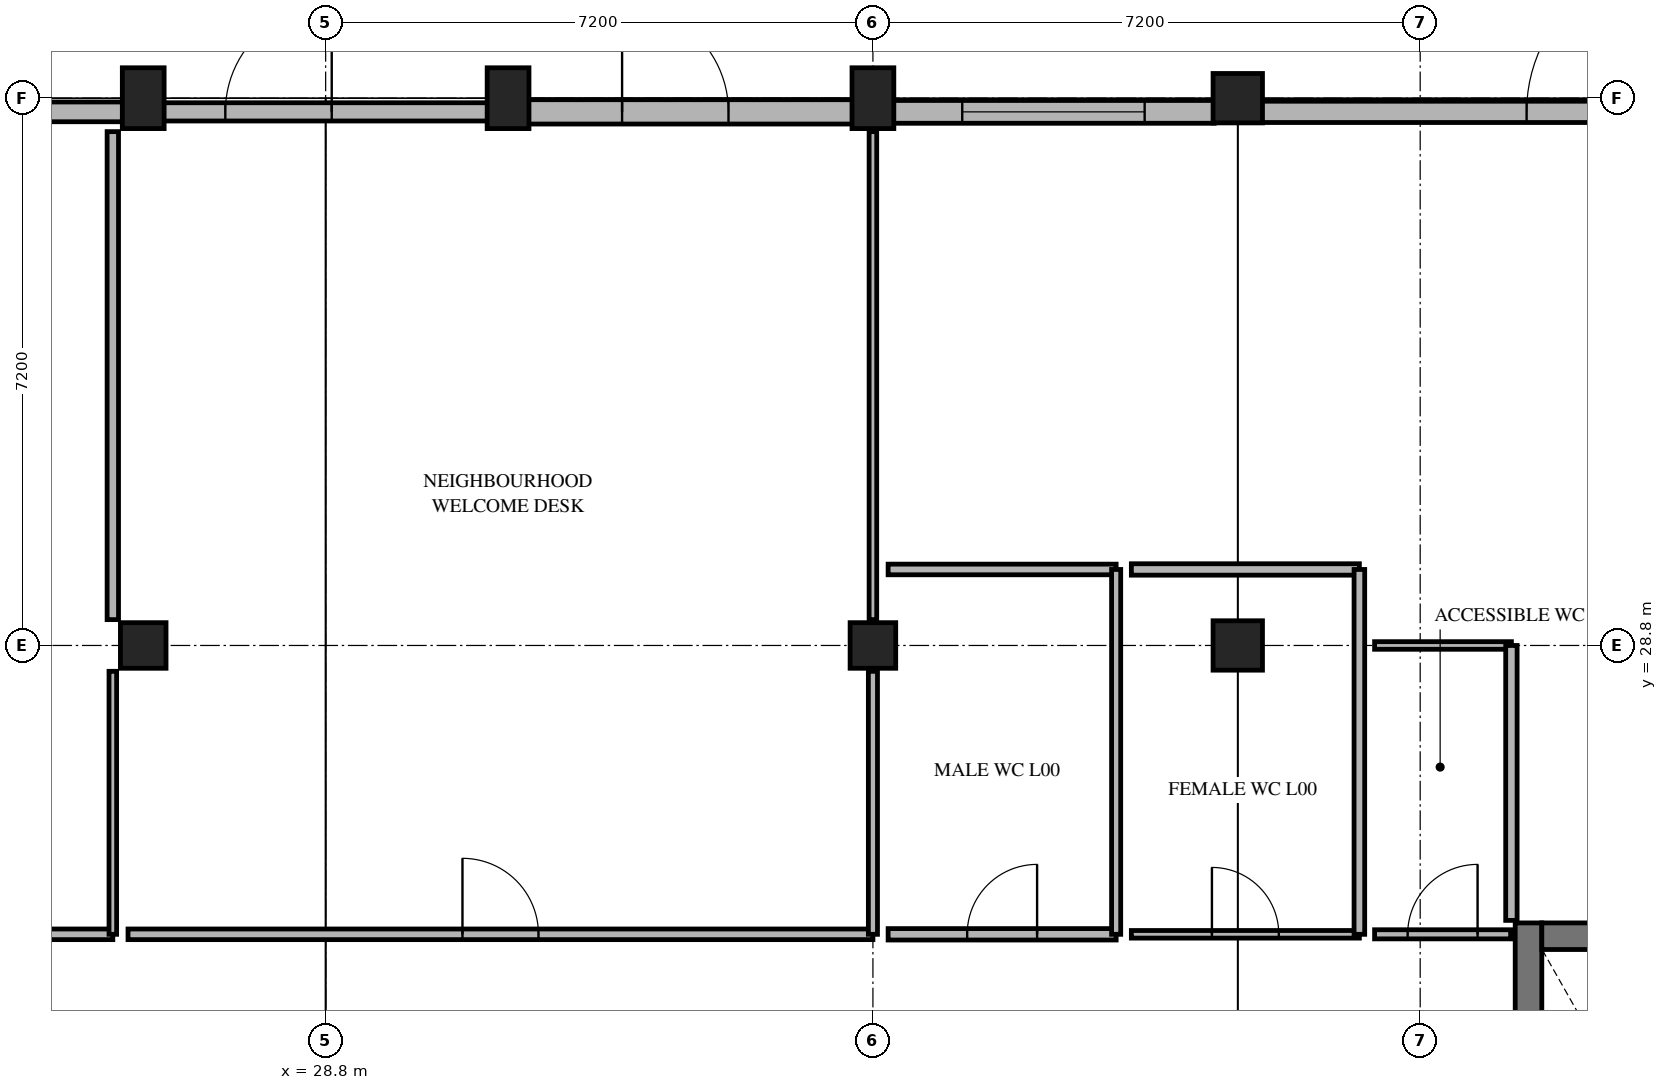
"""IFC4 building model, lengths in metres.
Left out: names, types, materials, properties, quantities, classifications, styles, units other than length and angle.
Written with IfcOpenShell. Run it as: python <this file> out.ifc"""

import sys

from ifc_helpers import new_model, si_unit, direction, frame, frame_2d, origin, origin_2d, place, context, subcontext, project, spatial, rectangle, extrude, element, fill, save


model = new_model("IFC4")
c1 = context("Model", 3, precision=1e-05, world=origin(), true_north=direction((0.0, 1.0)))
c2 = subcontext(c1, "Body", "Model", "MODEL_VIEW")
j1 = project(units=[si_unit("LENGTHUNIT", "METRE"), si_unit("PLANEANGLEUNIT", "RADIAN")], contexts=[c1])
p1 = place(None, origin())
s1 = spatial("IfcSite", under=j1, at=p1, CompositionType="ELEMENT")
p2 = place(p1, origin())
s2 = spatial("IfcBuilding", under=s1, at=p2, CompositionType="ELEMENT")
p3 = place(p2, origin())
s3 = spatial("IfcBuildingStorey", under=s2, at=p3, CompositionType="ELEMENT", Elevation=0.0)
for number, where, z_axis, x_axis in (
    (1, (40.8, 28.8, 0.0), (0.0, 0.0, 1.0), (1.0, 0.0, 0.0)),
    (2, (40.8, 36.0, 0.0), (0.0, 0.0, 1.0), (1.0, 0.0, 0.0)),
):
    element("IfcColumn", number, at=place(p3, frame(where, z_axis=z_axis, x_axis=x_axis)), inside=s3, PredefinedType="COLUMN", context=c2, shape_type="SweptSolid", body=[
        extrude(rectangle(XDim=0.65, YDim=0.65, at=origin_2d()), origin(), (0.0, 0.0, 1.0), 4.5),
    ])
for number, where, z_axis, x_axis in (
    (3, (26.4, 36.0, 0.0), (0.0, 0.0, 1.0), (1.0, 0.0, 0.0)),
    (4, (31.2, 36.0, 0.0), (0.0, 0.0, 1.0), (1.0, 0.0, 0.0)),
    (5, (36.0, 36.0, 0.0), (0.0, 0.0, 1.0), (1.0, 0.0, 0.0)),
):
    element("IfcColumn", number, at=place(p3, frame(where, z_axis=z_axis, x_axis=x_axis)), inside=s3, PredefinedType="COLUMN", context=c2, shape_type="SweptSolid", body=[
        extrude(rectangle(XDim=0.55, YDim=0.8, at=origin_2d()), origin(), (0.0, 0.0, 1.0), 4.5),
    ])
for number, where, z_axis, x_axis in (
    (6, (26.4, 28.8, 0.0), (0.0, 0.0, 1.0), (1.0, 0.0, 0.0)),
    (7, (36.0, 28.8, 0.0), (0.0, 0.0, 1.0), (1.0, 0.0, 0.0)),
):
    element("IfcColumn", number, at=place(p3, frame(where, z_axis=z_axis, x_axis=x_axis)), inside=s3, PredefinedType="COLUMN", context=c2, shape_type="SweptSolid", body=[
        extrude(rectangle(XDim=0.6, YDim=0.6, at=origin_2d()), origin(), (0.0, 0.0, 1.0), 4.5),
    ])
p4 = place(p3, frame((21.86, 35.82, 0.0), z_axis=(0.0, 0.0, 1.0), x_axis=(1.0, 0.0, 0.0)))
e8 = element("IfcWall", 8, at=p4, inside=s3, PredefinedType="SOLIDWALL", context=c2, shape_type="SweptSolid", body=[
    extrude(rectangle(XDim=4.28, YDim=0.26, at=frame_2d((2.14, 0.0))), origin(), (0.0, 0.0, 1.0), 3.49),
])
p5 = place(p4, frame((0.77, 0.0, 0.0)))
e9 = element("IfcOpeningElement", 9, at=p5, cuts=e8, PredefinedType="OPENING", context=c2, shape_type="SweptSolid", body=[
    extrude(rectangle(XDim=1.6, YDim=2.3, at=frame_2d((0.8, 1.15))), frame((0.0, 0.14, 0.0), z_axis=(0.0, -1.0, 0.0), x_axis=(1.0, 0.0, 0.0)), (0.0, 0.0, 1.0), 0.28),
])
p6 = place(p3, frame((26.66, 35.82, 0.0), z_axis=(0.0, 0.0, 1.0), x_axis=(1.0, 0.0, 0.0)))
e10 = element("IfcWall", 10, at=p6, inside=s3, PredefinedType="SOLIDWALL", context=c2, shape_type="SweptSolid", body=[
    extrude(rectangle(XDim=4.28, YDim=0.24, at=frame_2d((2.14, 0.0))), origin(), (0.0, 0.0, 1.0), 3.54),
])
p7 = place(p6, frame((0.82, 0.0, 0.0)))
e11 = element("IfcOpeningElement", 11, at=p7, cuts=e10, PredefinedType="OPENING", context=c2, shape_type="SweptSolid", body=[
    extrude(rectangle(XDim=1.4, YDim=2.2, at=frame_2d((0.7, 1.1))), frame((0.0, 0.13, 0.0), z_axis=(0.0, -1.0, 0.0), x_axis=(1.0, 0.0, 0.0)), (0.0, 0.0, 1.0), 0.26),
])
p8 = place(p3, frame((31.46, 35.82, 0.0), z_axis=(0.0, 0.0, 1.0), x_axis=(1.0, 0.0, 0.0)))
e12 = element("IfcWall", 12, at=p8, inside=s3, PredefinedType="SOLIDWALL", context=c2, shape_type="SweptSolid", body=[
    extrude(rectangle(XDim=4.28, YDim=0.32, at=frame_2d((2.14, 0.0))), origin(), (0.0, 0.0, 1.0), 3.59),
])
p9 = place(p8, frame((1.24, 0.0, 0.0)))
e13 = element("IfcOpeningElement", 13, at=p9, cuts=e12, PredefinedType="OPENING", context=c2, shape_type="SweptSolid", body=[
    extrude(rectangle(XDim=1.4, YDim=2.2, at=frame_2d((0.7, 1.1))), frame((0.0, 0.17, 0.0), z_axis=(0.0, -1.0, 0.0), x_axis=(1.0, 0.0, 0.0)), (0.0, 0.0, 1.0), 0.34),
])
p10 = place(p3, frame((36.26, 35.82, 0.0), z_axis=(0.0, 0.0, 1.0), x_axis=(1.0, 0.0, 0.0)))
e14 = element("IfcWall", 14, at=p10, inside=s3, PredefinedType="SOLIDWALL", context=c2, shape_type="SweptSolid", body=[
    extrude(rectangle(XDim=4.23, YDim=0.3, at=frame_2d((2.115, 0.0))), origin(), (0.0, 0.0, 1.0), 3.64),
])
p11 = place(p10, frame((0.915, 0.0, 0.9)))
e15 = element("IfcOpeningElement", 15, at=p11, cuts=e14, PredefinedType="OPENING", context=c2, shape_type="SweptSolid", body=[
    extrude(rectangle(XDim=2.4, YDim=1.35, at=frame_2d((1.2, 0.675))), frame((0.0, 0.16, 0.0), z_axis=(0.0, -1.0, 0.0), x_axis=(1.0, 0.0, 0.0)), (0.0, 0.0, 1.0), 0.32),
])
p12 = place(p3, frame((41.11, 35.82, 0.0), z_axis=(0.0, 0.0, 1.0), x_axis=(1.0, 0.0, 0.0)))
e16 = element("IfcWall", 16, at=p12, inside=s3, PredefinedType="SOLIDWALL", context=c2, shape_type="SweptSolid", body=[
    extrude(rectangle(XDim=8.98, YDim=0.28, at=frame_2d((4.49, 0.0))), origin(), (0.0, 0.0, 1.0), 3.44),
])
p13 = place(p12, frame((3.49, 0.0, 0.0)))
e17 = element("IfcOpeningElement", 17, at=p13, cuts=e16, PredefinedType="OPENING", context=c2, shape_type="SweptSolid", body=[
    extrude(rectangle(XDim=2.0, YDim=2.4, at=frame_2d((1.0, 1.2))), frame((0.0, 0.15, 0.0), z_axis=(0.0, -1.0, 0.0), x_axis=(1.0, 0.0, 0.0)), (0.0, 0.0, 1.0), 0.3),
])
p14 = place(p3, frame((44.625, 25.15, 0.0), z_axis=(0.0, 0.0, 1.0), x_axis=(0.0, -1.0, 0.0)))
e18 = element("IfcWall", 18, at=p14, inside=s3, PredefinedType="SHEAR", context=c2, shape_type="SweptSolid", body=[
    extrude(rectangle(XDim=9.1, YDim=0.35, at=frame_2d((4.55, 0.0))), origin(), (0.0, 0.0, 1.0), 4.24),
])
p15 = place(p3, frame((48.55, 24.975, 0.0), z_axis=(0.0, 0.0, 1.0), x_axis=(-1.0, 0.0, 0.0)))
e19 = element("IfcWall", 19, at=p15, inside=s3, PredefinedType="SHEAR", context=c2, shape_type="SweptSolid", body=[
    extrude(rectangle(XDim=3.75, YDim=0.35, at=frame_2d((1.875, 0.0))), origin(), (0.0, 0.0, 1.0), 4.24),
])
p16 = place(p3, frame((10.8, 25.0, 0.0), z_axis=(0.0, 0.0, 1.0), x_axis=(1.0, 0.0, 0.0)))
e20 = element("IfcWall", 20, at=p16, inside=s3, PredefinedType="PARTITIONING", context=c2, shape_type="SweptSolid", body=[
    extrude(rectangle(XDim=15.2, YDim=0.14, at=frame_2d((7.6, 0.0))), origin(), (0.0, 0.0, 1.0), 3.44),
])
p17 = place(p16, frame((7.05, 0.0, 0.0)))
e21 = element("IfcOpeningElement", 21, at=p17, cuts=e20, PredefinedType="OPENING", context=c2, shape_type="SweptSolid", body=[
    extrude(rectangle(XDim=1.1, YDim=2.15, at=frame_2d((0.55, 1.075))), frame((0.0, 0.08, 0.0), z_axis=(0.0, -1.0, 0.0), x_axis=(1.0, 0.0, 0.0)), (0.0, 0.0, 1.0), 0.16),
])
p18 = place(p3, frame((26.0, 25.0, 0.0), z_axis=(0.0, 0.0, 1.0), x_axis=(0.0, 1.0, 0.0)))
e22 = element("IfcWall", 22, at=p18, inside=s3, PredefinedType="PARTITIONING", context=c2, shape_type="SweptSolid", body=[
    extrude(rectangle(XDim=3.46, YDim=0.1, at=frame_2d((1.73, 0.0))), origin(), (0.0, 0.0, 1.0), 3.48),
])
p19 = place(p3, frame((26.0, 29.14, 0.0), z_axis=(0.0, 0.0, 1.0), x_axis=(0.0, 1.0, 0.0)))
e23 = element("IfcWall", 23, at=p19, inside=s3, PredefinedType="PARTITIONING", context=c2, shape_type="SweptSolid", body=[
    extrude(rectangle(XDim=6.42, YDim=0.15, at=frame_2d((3.21, 0.0))), origin(), (0.0, 0.0, 1.0), 3.69),
])
p20 = place(p3, frame((26.2, 25.0, 0.0), z_axis=(0.0, 0.0, 1.0), x_axis=(1.0, 0.0, 0.0)))
e24 = element("IfcWall", 24, at=p20, inside=s3, PredefinedType="PARTITIONING", context=c2, shape_type="SweptSolid", body=[
    extrude(rectangle(XDim=9.8, YDim=0.14, at=frame_2d((4.9, 0.0))), origin(), (0.0, 0.0, 1.0), 3.44),
])
p21 = place(p20, frame((4.4, 0.0, 0.0)))
e25 = element("IfcOpeningElement", 25, at=p21, cuts=e24, PredefinedType="OPENING", context=c2, shape_type="SweptSolid", body=[
    extrude(rectangle(XDim=1.0, YDim=2.15, at=frame_2d((0.5, 1.075))), frame((0.0, 0.08, 0.0), z_axis=(0.0, -1.0, 0.0), x_axis=(1.0, 0.0, 0.0)), (0.0, 0.0, 1.0), 0.16),
])
p22 = place(p3, frame((36.0, 25.0, 0.0), z_axis=(0.0, 0.0, 1.0), x_axis=(0.0, 1.0, 0.0)))
e26 = element("IfcWall", 26, at=p22, inside=s3, PredefinedType="PARTITIONING", context=c2, shape_type="SweptSolid", body=[
    extrude(rectangle(XDim=3.46, YDim=0.12, at=frame_2d((1.73, 0.0))), origin(), (0.0, 0.0, 1.0), 3.44),
])
p23 = place(p3, frame((36.0, 29.14, 0.0), z_axis=(0.0, 0.0, 1.0), x_axis=(0.0, 1.0, 0.0)))
e27 = element("IfcWall", 27, at=p23, inside=s3, PredefinedType="PARTITIONING", context=c2, shape_type="SweptSolid", body=[
    extrude(rectangle(XDim=6.42, YDim=0.1, at=frame_2d((3.21, 0.0))), origin(), (0.0, 0.0, 1.0), 3.49),
])
p24 = place(p3, frame((36.2, 25.0, 0.0), z_axis=(0.0, 0.0, 1.0), x_axis=(1.0, 0.0, 0.0)))
e28 = element("IfcWall", 28, at=p24, inside=s3, PredefinedType="PARTITIONING", context=c2, shape_type="SweptSolid", body=[
    extrude(rectangle(XDim=3.0, YDim=0.15, at=frame_2d((1.5, 0.0))), origin(), (0.0, 0.0, 1.0), 3.44),
])
p25 = place(p24, frame((1.04, 0.0, 0.0)))
e29 = element("IfcOpeningElement", 29, at=p25, cuts=e28, PredefinedType="OPENING", context=c2, shape_type="SweptSolid", body=[
    extrude(rectangle(XDim=0.92, YDim=2.1, at=frame_2d((0.46, 1.05))), frame((0.0, 0.085, 0.0), z_axis=(0.0, -1.0, 0.0), x_axis=(1.0, 0.0, 0.0)), (0.0, 0.0, 1.0), 0.17),
])
p26 = place(p3, frame((39.2, 29.8, 0.0), z_axis=(0.0, 0.0, 1.0), x_axis=(-1.0, 0.0, 0.0)))
e30 = element("IfcWall", 30, at=p26, inside=s3, PredefinedType="PARTITIONING", context=c2, shape_type="SweptSolid", body=[
    extrude(rectangle(XDim=3.0, YDim=0.14, at=frame_2d((1.5, 0.0))), origin(), (0.0, 0.0, 1.0), 3.49),
])
p27 = place(p3, frame((39.2, 25.0, 0.0), z_axis=(0.0, 0.0, 1.0), x_axis=(0.0, 1.0, 0.0)))
e31 = element("IfcWall", 31, at=p27, inside=s3, PredefinedType="PARTITIONING", context=c2, shape_type="SweptSolid", body=[
    extrude(rectangle(XDim=4.8, YDim=0.12, at=frame_2d((2.4, 0.0))), origin(), (0.0, 0.0, 1.0), 3.62),
])
p28 = place(p3, frame((39.4, 25.0, 0.0), z_axis=(0.0, 0.0, 1.0), x_axis=(1.0, 0.0, 0.0)))
e32 = element("IfcWall", 32, at=p28, inside=s3, PredefinedType="PARTITIONING", context=c2, shape_type="SweptSolid", body=[
    extrude(rectangle(XDim=3.0, YDim=0.1, at=frame_2d((1.5, 0.0))), origin(), (0.0, 0.0, 1.0), 3.44),
])
p29 = place(p28, frame((1.06, 0.0, 0.0)))
e33 = element("IfcOpeningElement", 33, at=p29, cuts=e32, PredefinedType="OPENING", context=c2, shape_type="SweptSolid", body=[
    extrude(rectangle(XDim=0.88, YDim=2.1, at=frame_2d((0.44, 1.05))), frame((0.0, 0.06, 0.0), z_axis=(0.0, -1.0, 0.0), x_axis=(1.0, 0.0, 0.0)), (0.0, 0.0, 1.0), 0.12),
])
p30 = place(p3, frame((42.4, 29.8, 0.0), z_axis=(0.0, 0.0, 1.0), x_axis=(-1.0, 0.0, 0.0)))
e34 = element("IfcWall", 34, at=p30, inside=s3, PredefinedType="PARTITIONING", context=c2, shape_type="SweptSolid", body=[
    extrude(rectangle(XDim=3.0, YDim=0.15, at=frame_2d((1.5, 0.0))), origin(), (0.0, 0.0, 1.0), 3.49),
])
p31 = place(p3, frame((42.4, 25.0, 0.0), z_axis=(0.0, 0.0, 1.0), x_axis=(0.0, 1.0, 0.0)))
e35 = element("IfcWall", 35, at=p31, inside=s3, PredefinedType="PARTITIONING", context=c2, shape_type="SweptSolid", body=[
    extrude(rectangle(XDim=4.8, YDim=0.14, at=frame_2d((2.4, 0.0))), origin(), (0.0, 0.0, 1.0), 3.44),
])
p32 = place(p3, frame((42.6, 25.0, 0.0), z_axis=(0.0, 0.0, 1.0), x_axis=(1.0, 0.0, 0.0)))
e36 = element("IfcWall", 36, at=p32, inside=s3, PredefinedType="PARTITIONING", context=c2, shape_type="SweptSolid", body=[
    extrude(rectangle(XDim=1.79, YDim=0.12, at=frame_2d((0.895, 0.0))), origin(), (0.0, 0.0, 1.0), 4.24),
])
p33 = place(p32, frame((0.435, 0.0, 0.0)))
e37 = element("IfcOpeningElement", 37, at=p33, cuts=e36, PredefinedType="OPENING", context=c2, shape_type="SweptSolid", body=[
    extrude(rectangle(XDim=0.92, YDim=2.1, at=frame_2d((0.46, 1.05))), frame((0.0, 0.07, 0.0), z_axis=(0.0, -1.0, 0.0), x_axis=(1.0, 0.0, 0.0)), (0.0, 0.0, 1.0), 0.14),
])
p34 = place(p3, frame((44.4, 28.8, 0.0), z_axis=(0.0, 0.0, 1.0), x_axis=(-1.0, 0.0, 0.0)))
e38 = element("IfcWall", 38, at=p34, inside=s3, PredefinedType="PARTITIONING", context=c2, shape_type="SweptSolid", body=[
    extrude(rectangle(XDim=1.8, YDim=0.1, at=frame_2d((0.9, 0.0))), origin(), (0.0, 0.0, 1.0), 3.44),
])
p35 = place(p3, frame((44.4, 25.183, 0.0), z_axis=(0.0, 0.0, 1.0), x_axis=(0.0, 1.0, 0.0)))
e39 = element("IfcWall", 39, at=p35, inside=s3, PredefinedType="PARTITIONING", context=c2, shape_type="SweptSolid", body=[
    extrude(rectangle(XDim=3.617, YDim=0.15, at=frame_2d((1.809, 0.0))), origin(), (0.0, 0.0, 1.0), 3.44),
])
p36 = place(p7, origin())
e40 = element("IfcDoor", 40, at=p36, inside=s3, OperationType="SINGLE_SWING_RIGHT", PredefinedType="DOOR", context=c2, shape_type="SweptSolid", body=[
    extrude(rectangle(XDim=1.4, YDim=2.2, at=frame_2d((0.7, 1.1))), frame((0.0, 0.025, 0.0), z_axis=(0.0, -1.0, 0.0), x_axis=(1.0, 0.0, 0.0)), (0.0, 0.0, 1.0), 0.05),
])
fill(e11, e40)
p37 = place(p9, origin())
e41 = element("IfcDoor", 41, at=p37, inside=s3, OperationType="SINGLE_SWING_LEFT", PredefinedType="DOOR", context=c2, shape_type="SweptSolid", body=[
    extrude(rectangle(XDim=1.4, YDim=2.2, at=frame_2d((0.7, 1.1))), frame((0.0, 0.025, 0.0), z_axis=(0.0, -1.0, 0.0), x_axis=(1.0, 0.0, 0.0)), (0.0, 0.0, 1.0), 0.05),
])
fill(e13, e41)
p38 = place(p11, origin())
e42 = element("IfcWindow", 42, at=p38, inside=s3, PartitioningType="SINGLE_PANEL", PredefinedType="WINDOW", context=c2, shape_type="SweptSolid", body=[
    extrude(rectangle(XDim=2.4, YDim=1.35, at=frame_2d((1.2, 0.675))), frame((0.0, 0.03, 0.0), z_axis=(0.0, -1.0, 0.0), x_axis=(1.0, 0.0, 0.0)), (0.0, 0.0, 1.0), 0.06),
])
fill(e15, e42)
p39 = place(p13, origin())
e43 = element("IfcDoor", 43, at=p39, inside=s3, OperationType="SINGLE_SWING_RIGHT", PredefinedType="DOOR", context=c2, shape_type="SweptSolid", body=[
    extrude(rectangle(XDim=2.0, YDim=2.4, at=frame_2d((1.0, 1.2))), frame((0.0, 0.025, 0.0), z_axis=(0.0, -1.0, 0.0), x_axis=(1.0, 0.0, 0.0)), (0.0, 0.0, 1.0), 0.05),
])
fill(e17, e43)
p40 = place(p21, origin())
e44 = element("IfcDoor", 44, at=p40, inside=s3, OperationType="SINGLE_SWING_LEFT", PredefinedType="DOOR", context=c2, shape_type="SweptSolid", body=[
    extrude(rectangle(XDim=1.0, YDim=2.15, at=frame_2d((0.5, 1.075))), frame((0.0, 0.025, 0.0), z_axis=(0.0, -1.0, 0.0), x_axis=(1.0, 0.0, 0.0)), (0.0, 0.0, 1.0), 0.05),
])
fill(e25, e44)
p41 = place(p25, origin())
e45 = element("IfcDoor", 45, at=p41, inside=s3, OperationType="SINGLE_SWING_RIGHT", PredefinedType="DOOR", context=c2, shape_type="SweptSolid", body=[
    extrude(rectangle(XDim=0.92, YDim=2.1, at=frame_2d((0.46, 1.05))), frame((0.0, 0.025, 0.0), z_axis=(0.0, -1.0, 0.0), x_axis=(1.0, 0.0, 0.0)), (0.0, 0.0, 1.0), 0.05),
])
fill(e29, e45)
p42 = place(p29, origin())
e46 = element("IfcDoor", 46, at=p42, inside=s3, OperationType="SINGLE_SWING_LEFT", PredefinedType="DOOR", context=c2, shape_type="SweptSolid", body=[
    extrude(rectangle(XDim=0.88, YDim=2.1, at=frame_2d((0.44, 1.05))), frame((0.0, 0.025, 0.0), z_axis=(0.0, -1.0, 0.0), x_axis=(1.0, 0.0, 0.0)), (0.0, 0.0, 1.0), 0.05),
])
fill(e33, e46)
p43 = place(p33, origin())
e47 = element("IfcDoor", 47, at=p43, inside=s3, OperationType="SINGLE_SWING_RIGHT", PredefinedType="DOOR", context=c2, shape_type="SweptSolid", body=[
    extrude(rectangle(XDim=0.92, YDim=2.1, at=frame_2d((0.46, 1.05))), frame((0.0, 0.025, 0.0), z_axis=(0.0, -1.0, 0.0), x_axis=(1.0, 0.0, 0.0)), (0.0, 0.0, 1.0), 0.05),
])
fill(e37, e47)
save(model, sys.argv[1])
